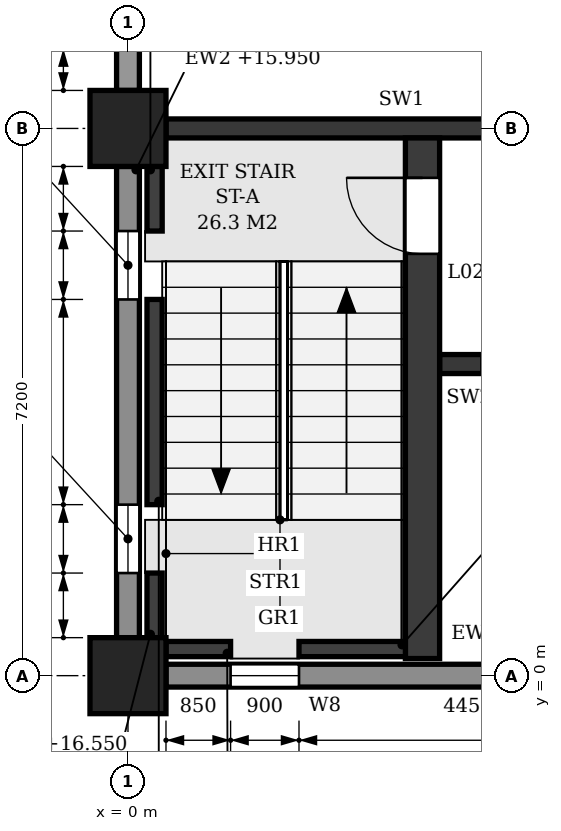
"""IFC4 building model, lengths in metres.
Left out: names, types, materials, properties, quantities, classifications, styles, units other than length and angle.
Written with IfcOpenShell. Run it as: python <this file> out.ifc"""

import sys

from ifc_helpers import new_model, si_unit, direction, frame, frame_2d, origin, origin_2d, place, context, subcontext, project, spatial, polyline, rectangle, outline, extrude, element, fill, save


model = new_model("IFC4")
c1 = context("Model", 3, precision=1e-05, world=origin(), true_north=direction((0.0, 1.0)))
c2 = subcontext(c1, "Body", "Model", "MODEL_VIEW")
j1 = project(units=[si_unit("LENGTHUNIT", "METRE"), si_unit("PLANEANGLEUNIT", "RADIAN")], contexts=[c1])
p1 = place(None, origin())
s1 = spatial("IfcSite", under=j1, at=p1, CompositionType="ELEMENT")
p2 = place(p1, origin())
s2 = spatial("IfcBuilding", under=s1, at=p2, CompositionType="ELEMENT")
p3 = place(p2, frame((0.0, 0.0, 11.4)))
s3 = spatial("IfcBuildingStorey", under=s2, at=p3, CompositionType="ELEMENT", Elevation=11.4)
for number, where, z_axis, x_axis in (
    (1, (0.0, 0.0, 0.0), (0.0, 0.0, 1.0), (1.0, 0.0, 0.0)),
    (2, (0.0, 7.2, 0.0), (0.0, 0.0, 1.0), (1.0, 0.0, 0.0)),
):
    element("IfcColumn", number, at=place(p3, frame(where, z_axis=z_axis, x_axis=x_axis)), inside=s3, PredefinedType="COLUMN", context=c2, shape_type="SweptSolid", body=[
        extrude(rectangle(XDim=1.0, YDim=1.0, at=origin_2d()), origin(), (0.0, 0.0, 1.0), 5.4),
    ])
p4 = place(p3, frame((0.0, 0.5, 0.0), z_axis=(0.0, 0.0, 1.0), x_axis=(0.0, 1.0, 0.0)))
e3 = element("IfcWall", 3, at=p4, inside=s3, PredefinedType="STANDARD", context=c2, shape_type="SweptSolid", body=[
    extrude(rectangle(XDim=6.2, YDim=0.3, at=frame_2d((3.1, 0.0))), origin(), (0.0, 0.0, 1.0), 4.55),
])
p5 = place(p4, frame((0.85, 0.0, 0.9)))
e4 = element("IfcOpeningElement", 4, at=p5, cuts=e3, PredefinedType="OPENING", context=c2, shape_type="SweptSolid", body=[
    extrude(outline(polyline([(0.0, 0.0), (0.9, 0.0), (0.9, 2.65), (0.45, 3.1), (0.0, 2.65), (0.0, 0.0)])), frame((0.0, 0.16, 0.0), z_axis=(0.0, -1.0, 0.0), x_axis=(1.0, 0.0, 0.0)), (0.0, 0.0, 1.0), 0.32),
])
p6 = place(p4, frame((4.45, 0.0, 0.9)))
e5 = element("IfcOpeningElement", 5, at=p6, cuts=e3, PredefinedType="OPENING", context=c2, shape_type="SweptSolid", body=[
    extrude(outline(polyline([(0.0, 0.0), (0.9, 0.0), (0.9, 2.65), (0.45, 3.1), (0.0, 2.65), (0.0, 0.0)])), frame((0.0, 0.16, 0.0), z_axis=(0.0, -1.0, 0.0), x_axis=(1.0, 0.0, 0.0)), (0.0, 0.0, 1.0), 0.32),
])
p7 = place(p3, frame((0.0, 7.7, 0.0), z_axis=(0.0, 0.0, 1.0), x_axis=(0.0, 1.0, 0.0)))
e6 = element("IfcWall", 6, at=p7, inside=s3, PredefinedType="STANDARD", context=c2, shape_type="SweptSolid", body=[
    extrude(rectangle(XDim=6.2, YDim=0.3, at=frame_2d((3.1, 0.0))), origin(), (0.0, 0.0, 1.0), 4.55),
])
p8 = place(p7, frame((0.55, 0.0, 0.9)))
e7 = element("IfcOpeningElement", 7, at=p8, cuts=e6, PredefinedType="OPENING", context=c2, shape_type="SweptSolid", body=[
    extrude(outline(polyline([(0.0, 0.0), (1.5, 0.0), (1.5, 2.35), (0.75, 3.1), (0.0, 2.35), (0.0, 0.0)])), frame((0.0, 0.16, 0.0), z_axis=(0.0, -1.0, 0.0), x_axis=(1.0, 0.0, 0.0)), (0.0, 0.0, 1.0), 0.32),
])
p9 = place(p7, frame((4.15, 0.0, 0.9)))
e8 = element("IfcOpeningElement", 8, at=p9, cuts=e6, PredefinedType="OPENING", context=c2, shape_type="SweptSolid", body=[
    extrude(outline(polyline([(0.0, 0.0), (1.5, 0.0), (1.5, 2.35), (0.75, 3.1), (0.0, 2.35), (0.0, 0.0)])), frame((0.0, 0.16, 0.0), z_axis=(0.0, -1.0, 0.0), x_axis=(1.0, 0.0, 0.0)), (0.0, 0.0, 1.0), 0.32),
])
p10 = place(p3, frame((0.5, 0.0, 0.0), z_axis=(0.0, 0.0, 1.0), x_axis=(1.0, 0.0, 0.0)))
e9 = element("IfcWall", 9, at=p10, inside=s3, PredefinedType="STANDARD", context=c2, shape_type="SweptSolid", body=[
    extrude(rectangle(XDim=6.2, YDim=0.3, at=frame_2d((3.1, 0.0))), origin(), (0.0, 0.0, 1.0), 4.55),
])
p11 = place(p10, frame((0.85, 0.0, 0.9)))
e10 = element("IfcOpeningElement", 10, at=p11, cuts=e9, PredefinedType="OPENING", context=c2, shape_type="SweptSolid", body=[
    extrude(outline(polyline([(0.0, 0.0), (0.9, 0.0), (0.9, 2.65), (0.45, 3.1), (0.0, 2.65), (0.0, 0.0)])), frame((0.0, 0.16, 0.0), z_axis=(0.0, -1.0, 0.0), x_axis=(1.0, 0.0, 0.0)), (0.0, 0.0, 1.0), 0.32),
])
p12 = place(p3, frame((0.5, 7.2, 0.0), z_axis=(0.0, 0.0, 1.0), x_axis=(1.0, 0.0, 0.0)))
e11 = element("IfcWall", 11, at=p12, inside=s3, PredefinedType="SHEAR", context=c2, shape_type="SweptSolid", body=[
    extrude(rectangle(XDim=6.2, YDim=0.25, at=frame_2d((3.1, 0.0))), origin(), (0.0, 0.0, 1.0), 4.4),
])
p13 = place(p12, frame((4.75, 0.0, 0.0)))
e12 = element("IfcOpeningElement", 12, at=p13, cuts=e11, PredefinedType="OPENING", context=c2, shape_type="SweptSolid", body=[
    extrude(rectangle(XDim=1.1, YDim=2.1, at=frame_2d((0.55, 1.05))), frame((0.0, 0.135, 0.0), z_axis=(0.0, -1.0, 0.0), x_axis=(1.0, 0.0, 0.0)), (0.0, 0.0, 1.0), 0.27),
])
p14 = place(p3, frame((0.35, 0.5, -0.25), z_axis=(0.0, 0.0, 1.0), x_axis=(0.0, 1.0, 0.0)))
e13 = element("IfcWall", 13, at=p14, inside=s3, PredefinedType="SHEAR", context=c2, shape_type="SweptSolid", body=[
    extrude(rectangle(XDim=0.85, YDim=0.2, at=frame_2d((0.425, 0.0))), origin(), (0.0, 0.0, 1.0), 5.4),
])
p15 = place(p3, frame((0.35, 2.25, -0.25), z_axis=(0.0, 0.0, 1.0), x_axis=(0.0, 1.0, 0.0)))
e14 = element("IfcWall", 14, at=p15, inside=s3, PredefinedType="SHEAR", context=c2, shape_type="SweptSolid", body=[
    extrude(rectangle(XDim=2.7, YDim=0.2, at=frame_2d((1.35, 0.0))), origin(), (0.0, 0.0, 1.0), 5.4),
])
p16 = place(p3, frame((0.35, 5.85, -0.25), z_axis=(0.0, 0.0, 1.0), x_axis=(0.0, 1.0, 0.0)))
e15 = element("IfcWall", 15, at=p16, inside=s3, PredefinedType="SHEAR", context=c2, shape_type="SweptSolid", body=[
    extrude(rectangle(XDim=0.85, YDim=0.2, at=frame_2d((0.425, 0.0))), origin(), (0.0, 0.0, 1.0), 5.4),
])
p17 = place(p3, frame((0.5, 0.35, -0.25), z_axis=(0.0, 0.0, 1.0), x_axis=(1.0, 0.0, 0.0)))
e16 = element("IfcWall", 16, at=p17, inside=s3, PredefinedType="SHEAR", context=c2, shape_type="SweptSolid", body=[
    extrude(rectangle(XDim=0.85, YDim=0.2, at=frame_2d((0.425, 0.0))), origin(), (0.0, 0.0, 1.0), 5.4),
])
p18 = place(p3, frame((2.25, 0.35, -0.25), z_axis=(0.0, 0.0, 1.0), x_axis=(1.0, 0.0, 0.0)))
e17 = element("IfcWall", 17, at=p18, inside=s3, PredefinedType="SHEAR", context=c2, shape_type="SweptSolid", body=[
    extrude(rectangle(XDim=1.4, YDim=0.2, at=frame_2d((0.7, 0.0))), origin(), (0.0, 0.0, 1.0), 5.4),
])
p19 = place(p3, frame((3.875, 0.225, 0.0), z_axis=(0.0, 0.0, 1.0), x_axis=(0.0, 1.0, 0.0)))
e18 = element("IfcWall", 18, at=p19, inside=s3, PredefinedType="SHEAR", context=c2, shape_type="SweptSolid", body=[
    extrude(rectangle(XDim=6.85, YDim=0.45, at=frame_2d((3.425, 0.0))), origin(), (0.0, 0.0, 1.0), 5.15),
])
p20 = place(p19, frame((5.325, 0.0, 0.0)))
e19 = element("IfcOpeningElement", 19, at=p20, cuts=e18, PredefinedType="OPENING", context=c2, shape_type="SweptSolid", body=[
    extrude(rectangle(XDim=1.0, YDim=2.1, at=frame_2d((0.5, 1.05))), frame((0.0, 0.235, 0.0), z_axis=(0.0, -1.0, 0.0), x_axis=(1.0, 0.0, 0.0)), (0.0, 0.0, 1.0), 0.47),
])
p21 = place(p3, frame((4.1, 4.1, 0.0), z_axis=(0.0, 0.0, 1.0), x_axis=(1.0, 0.0, 0.0)))
e20 = element("IfcWall", 20, at=p21, inside=s3, PredefinedType="SHEAR", context=c2, shape_type="SweptSolid", body=[
    extrude(rectangle(XDim=2.975, YDim=0.25, at=frame_2d((1.487, 0.0))), origin(), (0.0, 0.0, 1.0), 5.15),
])
p22 = place(p21, frame((0.55, 0.0, 0.0)))
e21 = element("IfcOpeningElement", 21, at=p22, cuts=e20, PredefinedType="OPENING", context=c2, shape_type="SweptSolid", body=[
    extrude(rectangle(XDim=0.9, YDim=2.1, at=frame_2d((0.45, 1.05))), frame((0.0, 0.135, 0.0), z_axis=(0.0, -1.0, 0.0), x_axis=(1.0, 0.0, 0.0)), (0.0, 0.0, 1.0), 0.27),
])
p23 = place(p11, origin())
e22 = element("IfcWindow", 22, at=p23, inside=s3, PartitioningType="SINGLE_PANEL", PredefinedType="WINDOW", context=c2, shape_type="SweptSolid", body=[
    extrude(outline(polyline([(0.0, 0.0), (0.9, 0.0), (0.9, 2.65), (0.45, 3.1), (0.0, 2.65), (0.0, 0.0)])), frame((0.0, 0.03, 0.0), z_axis=(0.0, -1.0, 0.0), x_axis=(1.0, 0.0, 0.0)), (0.0, 0.0, 1.0), 0.06),
])
fill(e10, e22)
p24 = place(p5, origin())
e23 = element("IfcWindow", 23, at=p24, inside=s3, PartitioningType="SINGLE_PANEL", PredefinedType="WINDOW", context=c2, shape_type="SweptSolid", body=[
    extrude(outline(polyline([(0.0, 0.0), (0.9, 0.0), (0.9, 2.65), (0.45, 3.1), (0.0, 2.65), (0.0, 0.0)])), frame((0.0, 0.03, 0.0), z_axis=(0.0, -1.0, 0.0), x_axis=(1.0, 0.0, 0.0)), (0.0, 0.0, 1.0), 0.06),
])
fill(e4, e23)
p25 = place(p6, origin())
e24 = element("IfcWindow", 24, at=p25, inside=s3, PartitioningType="SINGLE_PANEL", PredefinedType="WINDOW", context=c2, shape_type="SweptSolid", body=[
    extrude(outline(polyline([(0.0, 0.0), (0.9, 0.0), (0.9, 2.65), (0.45, 3.1), (0.0, 2.65), (0.0, 0.0)])), frame((0.0, 0.03, 0.0), z_axis=(0.0, -1.0, 0.0), x_axis=(1.0, 0.0, 0.0)), (0.0, 0.0, 1.0), 0.06),
])
fill(e5, e24)
p26 = place(p20, origin())
e25 = element("IfcDoor", 25, at=p26, inside=s3, OperationType="SINGLE_SWING_RIGHT", PredefinedType="DOOR", context=c2, shape_type="SweptSolid", body=[
    extrude(rectangle(XDim=1.0, YDim=2.1, at=frame_2d((0.5, 1.05))), frame((0.0, 0.025, 0.0), z_axis=(0.0, -1.0, 0.0), x_axis=(1.0, 0.0, 0.0)), (0.0, 0.0, 1.0), 0.05),
])
fill(e19, e25)
save(model, sys.argv[1])
